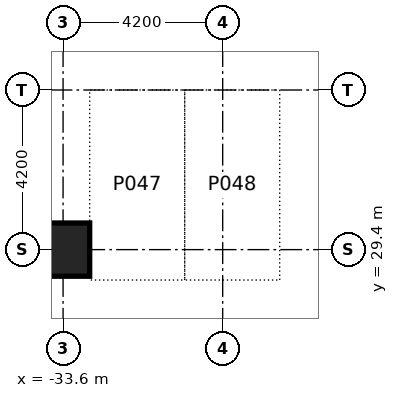
"""IFC4 building model, lengths in metres.
Left out: names, types, materials, properties, quantities, classifications, styles, units other than length and angle.
Written with IfcOpenShell. Run it as: python <this file> out.ifc"""

import sys

from ifc_helpers import new_model, si_unit, direction, frame, origin, origin_2d, place, context, subcontext, project, spatial, rectangle, extrude, element, save


model = new_model("IFC4")
c1 = context("Model", 3, precision=1e-05, world=origin(), true_north=direction((0.0, 1.0)))
c2 = subcontext(c1, "Body", "Model", "MODEL_VIEW")
j1 = project(units=[si_unit("LENGTHUNIT", "METRE"), si_unit("PLANEANGLEUNIT", "RADIAN")], contexts=[c1])
p1 = place(None, origin())
s1 = spatial("IfcSite", under=j1, at=p1, CompositionType="ELEMENT")
p2 = place(p1, origin())
s2 = spatial("IfcBuilding", under=s1, at=p2, CompositionType="ELEMENT")
p3 = place(p2, frame((0.0, 0.0, -4.2)))
s3 = spatial("IfcBuildingStorey", under=s2, at=p3, CompositionType="ELEMENT", Elevation=-4.2)
p4 = place(p3, frame((-33.6, 29.4, 0.0), z_axis=(0.0, 0.0, 1.0), x_axis=(1.0, 0.0, 0.0)))
e1 = element("IfcColumn", 1, at=p4, inside=s3, PredefinedType="COLUMN", context=c2, shape_type="SweptSolid", body=[
    extrude(rectangle(XDim=1.4, YDim=1.4, at=origin_2d()), origin(), (0.0, 0.0, 1.0), 4.2),
])
save(model, sys.argv[1])
